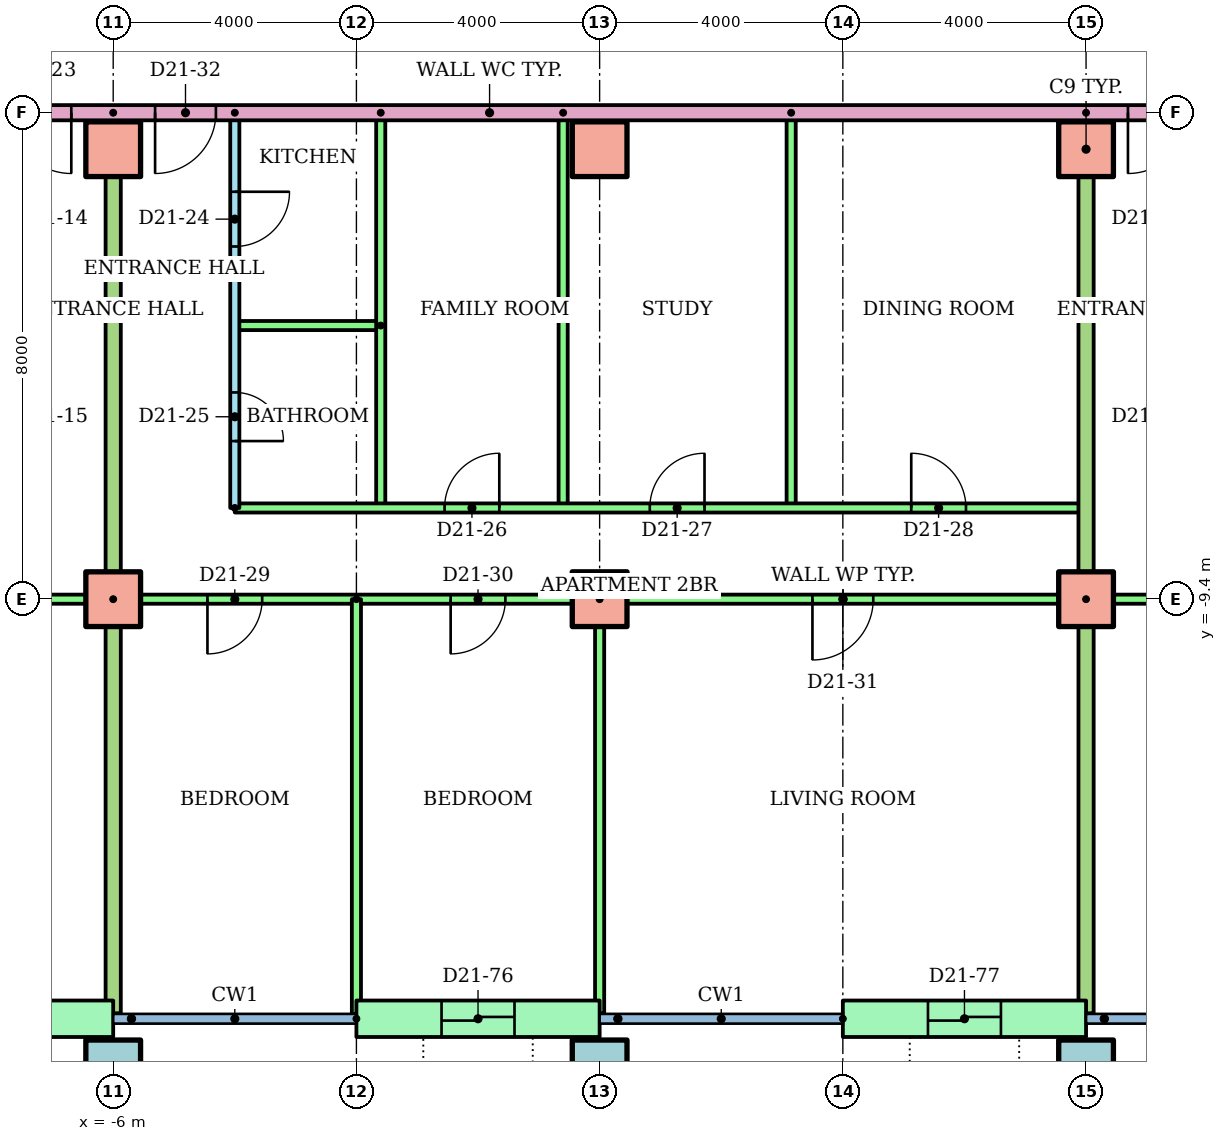
"""IFC4 building model, lengths in metres.
Left out: names, types, materials, properties, quantities, classifications, styles, units other than length and angle.
Written with IfcOpenShell. Run it as: python <this file> out.ifc"""

import sys

from ifc_helpers import new_model, si_unit, direction, frame, frame_2d, origin, origin_2d, place, context, subcontext, project, spatial, rectangle, hollow_rectangle, extrude, element, fill, save


model = new_model("IFC4")
c1 = context("Model", 3, precision=1e-05, world=origin(), true_north=direction((0.0, 1.0)))
c2 = subcontext(c1, "Body", "Model", "MODEL_VIEW")
j1 = project(units=[si_unit("LENGTHUNIT", "METRE"), si_unit("PLANEANGLEUNIT", "RADIAN")], contexts=[c1])
p1 = place(None, origin())
s1 = spatial("IfcSite", under=j1, at=p1, CompositionType="ELEMENT")
p2 = place(p1, origin())
s2 = spatial("IfcBuilding", under=s1, at=p2, CompositionType="ELEMENT")
p3 = place(p2, frame((0.0, 0.0, 83.9)))
s3 = spatial("IfcBuildingStorey", under=s2, at=p3, CompositionType="ELEMENT", Elevation=83.9)
for number, where in (
    (1, (-6.0, -17.1, 0.0)),
    (2, (2.0, -17.1, 0.0)),
    (3, (10.0, -17.1, 0.0)),
):
    element("IfcColumn", number, at=place(p3, frame(where)), inside=s3, PredefinedType="COLUMN", context=c2, shape_type="SweptSolid", body=[
        extrude(hollow_rectangle(XDim=0.9, YDim=0.9, WallThickness=0.045, at=origin_2d()), origin(), (0.0, 0.0, 1.0), 3.2),
    ])
for number, where in (
    (4, (-6.0, -9.4, 0.0)),
    (5, (2.0, -9.4, 0.0)),
    (6, (10.0, -9.4, 0.0)),
    (7, (-6.0, -2.0, 0.0)),
    (8, (2.0, -2.0, 0.0)),
    (9, (10.0, -2.0, 0.0)),
):
    element("IfcColumn", number, at=place(p3, frame(where)), inside=s3, PredefinedType="COLUMN", context=c2, shape_type="SweptSolid", body=[
        extrude(rectangle(XDim=0.9, YDim=0.9, at=origin_2d()), origin(), (0.0, 0.0, 1.0), 3.2),
    ])
p4 = place(p3, frame((-10.0, -16.3, 0.0)))
e10 = element("IfcWall", 10, at=p4, inside=s3, PredefinedType="STANDARD", context=c2, shape_type="SweptSolid", body=[
    extrude(rectangle(XDim=4.0, YDim=0.6, at=frame_2d((2.0, 0.0))), origin(), (0.0, 0.0, 1.0), 2.92),
])
p5 = place(p4, frame((1.4, 0.0, 0.0)))
e11 = element("IfcOpeningElement", 11, at=p5, cuts=e10, PredefinedType="OPENING", context=c2, shape_type="SweptSolid", body=[
    extrude(rectangle(XDim=1.2, YDim=2.1, at=frame_2d((0.6, 1.05))), frame((0.0, 0.31, 0.0), z_axis=(0.0, -1.0, 0.0), x_axis=(1.0, 0.0, 0.0)), (0.0, 0.0, 1.0), 0.62),
])
p6 = place(p3, frame((-2.0, -16.3, 0.0)))
e12 = element("IfcWall", 12, at=p6, inside=s3, PredefinedType="STANDARD", context=c2, shape_type="SweptSolid", body=[
    extrude(rectangle(XDim=4.0, YDim=0.6, at=frame_2d((2.0, 0.0))), origin(), (0.0, 0.0, 1.0), 2.92),
])
p7 = place(p6, frame((1.4, 0.0, 0.0)))
e13 = element("IfcOpeningElement", 13, at=p7, cuts=e12, PredefinedType="OPENING", context=c2, shape_type="SweptSolid", body=[
    extrude(rectangle(XDim=1.2, YDim=2.1, at=frame_2d((0.6, 1.05))), frame((0.0, 0.31, 0.0), z_axis=(0.0, -1.0, 0.0), x_axis=(1.0, 0.0, 0.0)), (0.0, 0.0, 1.0), 0.62),
])
p8 = place(p3, frame((6.0, -16.3, 0.0)))
e14 = element("IfcWall", 14, at=p8, inside=s3, PredefinedType="STANDARD", context=c2, shape_type="SweptSolid", body=[
    extrude(rectangle(XDim=4.0, YDim=0.6, at=frame_2d((2.0, 0.0))), origin(), (0.0, 0.0, 1.0), 2.92),
])
p9 = place(p8, frame((1.4, 0.0, 0.0)))
e15 = element("IfcOpeningElement", 15, at=p9, cuts=e14, PredefinedType="OPENING", context=c2, shape_type="SweptSolid", body=[
    extrude(rectangle(XDim=1.2, YDim=2.1, at=frame_2d((0.6, 1.05))), frame((0.0, 0.31, 0.0), z_axis=(0.0, -1.0, 0.0), x_axis=(1.0, 0.0, 0.0)), (0.0, 0.0, 1.0), 0.62),
])
p10 = place(p3, frame((-6.0, -9.4, 0.0), z_axis=(0.0, 0.0, 1.0), x_axis=(-1.0, 0.0, 0.0)))
e16 = element("IfcWall", 16, at=p10, inside=s3, PredefinedType="PARTITIONING", context=c2, shape_type="SweptSolid", body=[
    extrude(rectangle(XDim=22.61, YDim=0.15, at=frame_2d((11.305, 0.0))), origin(), (0.0, 0.0, 1.0), 2.4),
])
p11 = place(p10, frame((19.7, 0.0, 0.0)))
e17 = element("IfcOpeningElement", 17, at=p11, cuts=e16, PredefinedType="OPENING", context=c2, shape_type="SweptSolid", body=[
    extrude(rectangle(XDim=0.9, YDim=2.1, at=frame_2d((0.45, 1.05))), frame((0.0, 0.085, 0.0), z_axis=(0.0, -1.0, 0.0), x_axis=(1.0, 0.0, 0.0)), (0.0, 0.0, 1.0), 0.17),
])
p12 = place(p10, frame((12.45, 0.0, 0.0)))
e18 = element("IfcOpeningElement", 18, at=p12, cuts=e16, PredefinedType="OPENING", context=c2, shape_type="SweptSolid", body=[
    extrude(rectangle(XDim=1.0, YDim=2.1, at=frame_2d((0.5, 1.05))), frame((0.0, 0.085, 0.0), z_axis=(0.0, -1.0, 0.0), x_axis=(1.0, 0.0, 0.0)), (0.0, 0.0, 1.0), 0.17),
])
p13 = place(p10, frame((5.55, 0.0, 0.0)))
e19 = element("IfcOpeningElement", 19, at=p13, cuts=e16, PredefinedType="OPENING", context=c2, shape_type="SweptSolid", body=[
    extrude(rectangle(XDim=0.9, YDim=2.1, at=frame_2d((0.45, 1.05))), frame((0.0, 0.085, 0.0), z_axis=(0.0, -1.0, 0.0), x_axis=(1.0, 0.0, 0.0)), (0.0, 0.0, 1.0), 0.17),
])
p14 = place(p10, frame((1.55, 0.0, 0.0)))
e20 = element("IfcOpeningElement", 20, at=p14, cuts=e16, PredefinedType="OPENING", context=c2, shape_type="SweptSolid", body=[
    extrude(rectangle(XDim=0.9, YDim=2.1, at=frame_2d((0.45, 1.05))), frame((0.0, 0.085, 0.0), z_axis=(0.0, -1.0, 0.0), x_axis=(1.0, 0.0, 0.0)), (0.0, 0.0, 1.0), 0.17),
])
p15 = place(p3, frame((-4.0, -1.4, 0.0), z_axis=(0.0, 0.0, 1.0), x_axis=(0.0, -1.0, 0.0)))
e21 = element("IfcWall", 21, at=p15, inside=s3, PredefinedType="PARTITIONING", context=c2, shape_type="SweptSolid", body=[
    extrude(rectangle(XDim=6.5, YDim=0.15, at=frame_2d((3.25, 0.0))), origin(), (0.0, 0.0, 1.0), 2.4),
])
p16 = place(p15, frame((1.3, 0.0, 0.0)))
e22 = element("IfcOpeningElement", 22, at=p16, cuts=e21, PredefinedType="OPENING", context=c2, shape_type="SweptSolid", body=[
    extrude(rectangle(XDim=0.9, YDim=2.1, at=frame_2d((0.45, 1.05))), frame((0.0, 0.085, 0.0), z_axis=(0.0, -1.0, 0.0), x_axis=(1.0, 0.0, 0.0)), (0.0, 0.0, 1.0), 0.17),
])
p17 = place(p15, frame((4.6, 0.0, 0.0)))
e23 = element("IfcOpeningElement", 23, at=p17, cuts=e21, PredefinedType="OPENING", context=c2, shape_type="SweptSolid", body=[
    extrude(rectangle(XDim=0.8, YDim=2.1, at=frame_2d((0.4, 1.05))), frame((0.0, 0.085, 0.0), z_axis=(0.0, -1.0, 0.0), x_axis=(1.0, 0.0, 0.0)), (0.0, 0.0, 1.0), 0.17),
])
p18 = place(p3, frame((-1.6, -4.9, 0.0), z_axis=(0.0, 0.0, 1.0), x_axis=(-1.0, 0.0, 0.0)))
e24 = element("IfcWall", 24, at=p18, inside=s3, PredefinedType="PARTITIONING", context=c2, shape_type="SweptSolid", body=[
    extrude(rectangle(XDim=2.4, YDim=0.15, at=frame_2d((1.2, 0.0))), origin(), (0.0, 0.0, 1.0), 2.4),
])
for number, where, z_axis, x_axis in (
    (25, (-1.6, -1.4, 0.0), (0.0, 0.0, 1.0), (0.0, -1.0, 0.0)),
    (26, (1.4, -1.4, 0.0), (0.0, 0.0, 1.0), (0.0, -1.0, 0.0)),
    (27, (5.15, -1.4, 0.0), (0.0, 0.0, 1.0), (0.0, -1.0, 0.0)),
):
    element("IfcWall", number, at=place(p3, frame(where, z_axis=z_axis, x_axis=x_axis)), inside=s3, PredefinedType="PARTITIONING", context=c2, shape_type="SweptSolid", body=[
        extrude(rectangle(XDim=6.5, YDim=0.15, at=frame_2d((3.25, 0.0))), origin(), (0.0, 0.0, 1.0), 2.4),
    ])
p19 = place(p3, frame((-4.0, -7.9, 0.0)))
e28 = element("IfcWall", 28, at=p19, inside=s3, PredefinedType="PARTITIONING", context=c2, shape_type="SweptSolid", body=[
    extrude(rectangle(XDim=14.0, YDim=0.15, at=frame_2d((7.0, 0.0))), origin(), (0.0, 0.0, 1.0), 2.4),
])
p20 = place(p19, frame((3.45, 0.0, 0.0)))
e29 = element("IfcOpeningElement", 29, at=p20, cuts=e28, PredefinedType="OPENING", context=c2, shape_type="SweptSolid", body=[
    extrude(rectangle(XDim=0.9, YDim=2.1, at=frame_2d((0.45, 1.05))), frame((0.0, 0.085, 0.0), z_axis=(0.0, -1.0, 0.0), x_axis=(1.0, 0.0, 0.0)), (0.0, 0.0, 1.0), 0.17),
])
p21 = place(p19, frame((6.825, 0.0, 0.0)))
e30 = element("IfcOpeningElement", 30, at=p21, cuts=e28, PredefinedType="OPENING", context=c2, shape_type="SweptSolid", body=[
    extrude(rectangle(XDim=0.9, YDim=2.1, at=frame_2d((0.45, 1.05))), frame((0.0, 0.085, 0.0), z_axis=(0.0, -1.0, 0.0), x_axis=(1.0, 0.0, 0.0)), (0.0, 0.0, 1.0), 0.17),
])
p22 = place(p19, frame((11.125, 0.0, 0.0)))
e31 = element("IfcOpeningElement", 31, at=p22, cuts=e28, PredefinedType="OPENING", context=c2, shape_type="SweptSolid", body=[
    extrude(rectangle(XDim=0.9, YDim=2.1, at=frame_2d((0.45, 1.05))), frame((0.0, 0.085, 0.0), z_axis=(0.0, -1.0, 0.0), x_axis=(1.0, 0.0, 0.0)), (0.0, 0.0, 1.0), 0.17),
])
p23 = place(p3, frame((10.0, -9.4, 0.0), z_axis=(0.0, 0.0, 1.0), x_axis=(-1.0, 0.0, 0.0)))
e32 = element("IfcWall", 32, at=p23, inside=s3, PredefinedType="PARTITIONING", context=c2, shape_type="SweptSolid", body=[
    extrude(rectangle(XDim=16.0, YDim=0.15, at=frame_2d((8.0, 0.0))), origin(), (0.0, 0.0, 1.0), 2.4),
])
p24 = place(p23, frame((13.55, 0.0, 0.0)))
e33 = element("IfcOpeningElement", 33, at=p24, cuts=e32, PredefinedType="OPENING", context=c2, shape_type="SweptSolid", body=[
    extrude(rectangle(XDim=0.9, YDim=2.1, at=frame_2d((0.45, 1.05))), frame((0.0, 0.085, 0.0), z_axis=(0.0, -1.0, 0.0), x_axis=(1.0, 0.0, 0.0)), (0.0, 0.0, 1.0), 0.17),
])
p25 = place(p23, frame((9.55, 0.0, 0.0)))
e34 = element("IfcOpeningElement", 34, at=p25, cuts=e32, PredefinedType="OPENING", context=c2, shape_type="SweptSolid", body=[
    extrude(rectangle(XDim=0.9, YDim=2.1, at=frame_2d((0.45, 1.05))), frame((0.0, 0.085, 0.0), z_axis=(0.0, -1.0, 0.0), x_axis=(1.0, 0.0, 0.0)), (0.0, 0.0, 1.0), 0.17),
])
p26 = place(p23, frame((3.5, 0.0, 0.0)))
e35 = element("IfcOpeningElement", 35, at=p26, cuts=e32, PredefinedType="OPENING", context=c2, shape_type="SweptSolid", body=[
    extrude(rectangle(XDim=1.0, YDim=2.1, at=frame_2d((0.5, 1.05))), frame((0.0, 0.085, 0.0), z_axis=(0.0, -1.0, 0.0), x_axis=(1.0, 0.0, 0.0)), (0.0, 0.0, 1.0), 0.17),
])
p27 = place(p3, frame((-2.0, -9.4, 0.0), z_axis=(0.0, 0.0, 1.0), x_axis=(0.0, -1.0, 0.0)))
e36 = element("IfcWall", 36, at=p27, inside=s3, PredefinedType="PARTITIONING", context=c2, shape_type="SweptSolid", body=[
    extrude(rectangle(XDim=6.821, YDim=0.15, at=frame_2d((3.411, 0.0))), origin(), (0.0, 0.0, 1.0), 2.4),
])
p28 = place(p3, frame((2.0, -9.4, 0.0), z_axis=(0.0, 0.0, 1.0), x_axis=(0.0, -1.0, 0.0)))
e37 = element("IfcWall", 37, at=p28, inside=s3, PredefinedType="PARTITIONING", context=c2, shape_type="SweptSolid", body=[
    extrude(rectangle(XDim=6.81, YDim=0.15, at=frame_2d((3.405, 0.0))), origin(), (0.0, 0.0, 1.0), 2.4),
])
p29 = place(p3, frame((-6.0, -1.4, 0.0), z_axis=(0.0, 0.0, 1.0), x_axis=(0.0, -1.0, 0.0)))
e38 = element("IfcWall", 38, at=p29, inside=s3, PredefinedType="PARTITIONING", context=c2, shape_type="SweptSolid", body=[
    extrude(rectangle(XDim=14.81, YDim=0.25, at=frame_2d((7.405, 0.0))), origin(), (0.0, 0.0, 1.0), 2.4),
])
p30 = place(p3, frame((26.0, -9.4, 0.0), z_axis=(0.0, 0.0, 1.0), x_axis=(-1.0, 0.0, 0.0)))
e39 = element("IfcWall", 39, at=p30, inside=s3, PredefinedType="PARTITIONING", context=c2, shape_type="SweptSolid", body=[
    extrude(rectangle(XDim=16.0, YDim=0.15, at=frame_2d((8.0, 0.0))), origin(), (0.0, 0.0, 1.0), 2.4),
])
p31 = place(p30, frame((13.55, 0.0, 0.0)))
e40 = element("IfcOpeningElement", 40, at=p31, cuts=e39, PredefinedType="OPENING", context=c2, shape_type="SweptSolid", body=[
    extrude(rectangle(XDim=0.9, YDim=2.1, at=frame_2d((0.45, 1.05))), frame((0.0, 0.085, 0.0), z_axis=(0.0, -1.0, 0.0), x_axis=(1.0, 0.0, 0.0)), (0.0, 0.0, 1.0), 0.17),
])
p32 = place(p30, frame((9.55, 0.0, 0.0)))
e41 = element("IfcOpeningElement", 41, at=p32, cuts=e39, PredefinedType="OPENING", context=c2, shape_type="SweptSolid", body=[
    extrude(rectangle(XDim=0.9, YDim=2.1, at=frame_2d((0.45, 1.05))), frame((0.0, 0.085, 0.0), z_axis=(0.0, -1.0, 0.0), x_axis=(1.0, 0.0, 0.0)), (0.0, 0.0, 1.0), 0.17),
])
p33 = place(p30, frame((5.55, 0.0, 0.0)))
e42 = element("IfcOpeningElement", 42, at=p33, cuts=e39, PredefinedType="OPENING", context=c2, shape_type="SweptSolid", body=[
    extrude(rectangle(XDim=0.9, YDim=2.1, at=frame_2d((0.45, 1.05))), frame((0.0, 0.085, 0.0), z_axis=(0.0, -1.0, 0.0), x_axis=(1.0, 0.0, 0.0)), (0.0, 0.0, 1.0), 0.17),
])
p34 = place(p30, frame((1.5, 0.0, 0.0)))
e43 = element("IfcOpeningElement", 43, at=p34, cuts=e39, PredefinedType="OPENING", context=c2, shape_type="SweptSolid", body=[
    extrude(rectangle(XDim=1.0, YDim=2.1, at=frame_2d((0.5, 1.05))), frame((0.0, 0.085, 0.0), z_axis=(0.0, -1.0, 0.0), x_axis=(1.0, 0.0, 0.0)), (0.0, 0.0, 1.0), 0.17),
])
p35 = place(p3, frame((10.0, -1.4, 0.0), z_axis=(0.0, 0.0, 1.0), x_axis=(0.0, -1.0, 0.0)))
e44 = element("IfcWall", 44, at=p35, inside=s3, PredefinedType="PARTITIONING", context=c2, shape_type="SweptSolid", body=[
    extrude(rectangle(XDim=14.81, YDim=0.25, at=frame_2d((7.405, 0.0))), origin(), (0.0, 0.0, 1.0), 2.4),
])
p36 = place(p3, frame((14.0, -1.4, 0.0), z_axis=(0.0, 0.0, 1.0), x_axis=(-1.0, 0.0, 0.0)))
e45 = element("IfcWall", 45, at=p36, inside=s3, PredefinedType="PARTITIONING", context=c2, shape_type="SweptSolid", body=[
    extrude(rectangle(XDim=28.0, YDim=0.25, at=frame_2d((14.0, 0.0))), origin(), (0.0, 0.0, 1.0), 2.4),
])
p37 = place(p36, frame((20.689, 0.0, 0.0)))
e46 = element("IfcOpeningElement", 46, at=p37, cuts=e45, PredefinedType="OPENING", context=c2, shape_type="SweptSolid", body=[
    extrude(rectangle(XDim=1.0, YDim=2.1, at=frame_2d((0.5, 1.05))), frame((0.0, 0.135, 0.0), z_axis=(0.0, -1.0, 0.0), x_axis=(1.0, 0.0, 0.0)), (0.0, 0.0, 1.0), 0.27),
])
p38 = place(p36, frame((18.311, 0.0, 0.0)))
e47 = element("IfcOpeningElement", 47, at=p38, cuts=e45, PredefinedType="OPENING", context=c2, shape_type="SweptSolid", body=[
    extrude(rectangle(XDim=1.0, YDim=2.1, at=frame_2d((0.5, 1.05))), frame((0.0, 0.135, 0.0), z_axis=(0.0, -1.0, 0.0), x_axis=(1.0, 0.0, 0.0)), (0.0, 0.0, 1.0), 0.27),
])
p39 = place(p36, frame((2.311, 0.0, 0.0)))
e48 = element("IfcOpeningElement", 48, at=p39, cuts=e45, PredefinedType="OPENING", context=c2, shape_type="SweptSolid", body=[
    extrude(rectangle(XDim=1.0, YDim=2.1, at=frame_2d((0.5, 1.05))), frame((0.0, 0.135, 0.0), z_axis=(0.0, -1.0, 0.0), x_axis=(1.0, 0.0, 0.0)), (0.0, 0.0, 1.0), 0.27),
])
p40 = place(p37, origin())
e49 = element("IfcDoor", 49, at=p40, inside=s3, OperationType="SINGLE_SWING_LEFT", PredefinedType="DOOR", context=c2, shape_type="SweptSolid", body=[
    extrude(rectangle(XDim=1.0, YDim=2.1, at=frame_2d((0.5, 1.05))), frame((0.0, 0.025, 0.0), z_axis=(0.0, -1.0, 0.0), x_axis=(1.0, 0.0, 0.0)), (0.0, 0.0, 1.0), 0.05),
])
fill(e46, e49)
p41 = place(p16, origin())
e50 = element("IfcDoor", 50, at=p41, inside=s3, OperationType="SINGLE_SWING_LEFT", PredefinedType="DOOR", context=c2, shape_type="SweptSolid", body=[
    extrude(rectangle(XDim=0.9, YDim=2.1, at=frame_2d((0.45, 1.05))), frame((0.0, 0.025, 0.0), z_axis=(0.0, -1.0, 0.0), x_axis=(1.0, 0.0, 0.0)), (0.0, 0.0, 1.0), 0.05),
])
fill(e22, e50)
p42 = place(p17, origin())
e51 = element("IfcDoor", 51, at=p42, inside=s3, OperationType="SINGLE_SWING_RIGHT", PredefinedType="DOOR", context=c2, shape_type="SweptSolid", body=[
    extrude(rectangle(XDim=0.8, YDim=2.1, at=frame_2d((0.4, 1.05))), frame((0.0, 0.025, 0.0), z_axis=(0.0, -1.0, 0.0), x_axis=(1.0, 0.0, 0.0)), (0.0, 0.0, 1.0), 0.05),
])
fill(e23, e51)
p43 = place(p20, origin())
e52 = element("IfcDoor", 52, at=p43, inside=s3, OperationType="SINGLE_SWING_RIGHT", PredefinedType="DOOR", context=c2, shape_type="SweptSolid", body=[
    extrude(rectangle(XDim=0.9, YDim=2.1, at=frame_2d((0.45, 1.05))), frame((0.0, 0.025, 0.0), z_axis=(0.0, -1.0, 0.0), x_axis=(1.0, 0.0, 0.0)), (0.0, 0.0, 1.0), 0.05),
])
fill(e29, e52)
p44 = place(p21, origin())
e53 = element("IfcDoor", 53, at=p44, inside=s3, OperationType="SINGLE_SWING_RIGHT", PredefinedType="DOOR", context=c2, shape_type="SweptSolid", body=[
    extrude(rectangle(XDim=0.9, YDim=2.1, at=frame_2d((0.45, 1.05))), frame((0.0, 0.025, 0.0), z_axis=(0.0, -1.0, 0.0), x_axis=(1.0, 0.0, 0.0)), (0.0, 0.0, 1.0), 0.05),
])
fill(e30, e53)
p45 = place(p22, origin())
e54 = element("IfcDoor", 54, at=p45, inside=s3, OperationType="SINGLE_SWING_LEFT", PredefinedType="DOOR", context=c2, shape_type="SweptSolid", body=[
    extrude(rectangle(XDim=0.9, YDim=2.1, at=frame_2d((0.45, 1.05))), frame((0.0, 0.025, 0.0), z_axis=(0.0, -1.0, 0.0), x_axis=(1.0, 0.0, 0.0)), (0.0, 0.0, 1.0), 0.05),
])
fill(e31, e54)
p46 = place(p24, origin())
e55 = element("IfcDoor", 55, at=p46, inside=s3, OperationType="SINGLE_SWING_RIGHT", PredefinedType="DOOR", context=c2, shape_type="SweptSolid", body=[
    extrude(rectangle(XDim=0.9, YDim=2.1, at=frame_2d((0.45, 1.05))), frame((0.0, 0.025, 0.0), z_axis=(0.0, -1.0, 0.0), x_axis=(1.0, 0.0, 0.0)), (0.0, 0.0, 1.0), 0.05),
])
fill(e33, e55)
p47 = place(p25, origin())
e56 = element("IfcDoor", 56, at=p47, inside=s3, OperationType="SINGLE_SWING_RIGHT", PredefinedType="DOOR", context=c2, shape_type="SweptSolid", body=[
    extrude(rectangle(XDim=0.9, YDim=2.1, at=frame_2d((0.45, 1.05))), frame((0.0, 0.025, 0.0), z_axis=(0.0, -1.0, 0.0), x_axis=(1.0, 0.0, 0.0)), (0.0, 0.0, 1.0), 0.05),
])
fill(e34, e56)
p48 = place(p26, origin())
e57 = element("IfcDoor", 57, at=p48, inside=s3, OperationType="SINGLE_SWING_RIGHT", PredefinedType="DOOR", context=c2, shape_type="SweptSolid", body=[
    extrude(rectangle(XDim=1.0, YDim=2.1, at=frame_2d((0.5, 1.05))), frame((0.0, 0.025, 0.0), z_axis=(0.0, -1.0, 0.0), x_axis=(1.0, 0.0, 0.0)), (0.0, 0.0, 1.0), 0.05),
])
fill(e35, e57)
p49 = place(p38, origin())
e58 = element("IfcDoor", 58, at=p49, inside=s3, OperationType="SINGLE_SWING_RIGHT", PredefinedType="DOOR", context=c2, shape_type="SweptSolid", body=[
    extrude(rectangle(XDim=1.0, YDim=2.1, at=frame_2d((0.5, 1.05))), frame((0.0, 0.025, 0.0), z_axis=(0.0, -1.0, 0.0), x_axis=(1.0, 0.0, 0.0)), (0.0, 0.0, 1.0), 0.05),
])
fill(e47, e58)
p50 = place(p39, origin())
e59 = element("IfcDoor", 59, at=p50, inside=s3, OperationType="SINGLE_SWING_RIGHT", PredefinedType="DOOR", context=c2, shape_type="SweptSolid", body=[
    extrude(rectangle(XDim=1.0, YDim=2.1, at=frame_2d((0.5, 1.05))), frame((0.0, 0.025, 0.0), z_axis=(0.0, -1.0, 0.0), x_axis=(1.0, 0.0, 0.0)), (0.0, 0.0, 1.0), 0.05),
])
fill(e48, e59)
p51 = place(p7, origin())
e60 = element("IfcDoor", 60, at=p51, inside=s3, OperationType="SLIDING_TO_LEFT", PredefinedType="DOOR", context=c2, shape_type="SweptSolid", body=[
    extrude(rectangle(XDim=1.2, YDim=2.1, at=frame_2d((0.6, 1.05))), frame((0.0, 0.025, 0.0), z_axis=(0.0, -1.0, 0.0), x_axis=(1.0, 0.0, 0.0)), (0.0, 0.0, 1.0), 0.05),
])
fill(e13, e60)
p52 = place(p9, origin())
e61 = element("IfcDoor", 61, at=p52, inside=s3, OperationType="SLIDING_TO_LEFT", PredefinedType="DOOR", context=c2, shape_type="SweptSolid", body=[
    extrude(rectangle(XDim=1.2, YDim=2.1, at=frame_2d((0.6, 1.05))), frame((0.0, 0.025, 0.0), z_axis=(0.0, -1.0, 0.0), x_axis=(1.0, 0.0, 0.0)), (0.0, 0.0, 1.0), 0.05),
])
fill(e15, e61)
save(model, sys.argv[1])
